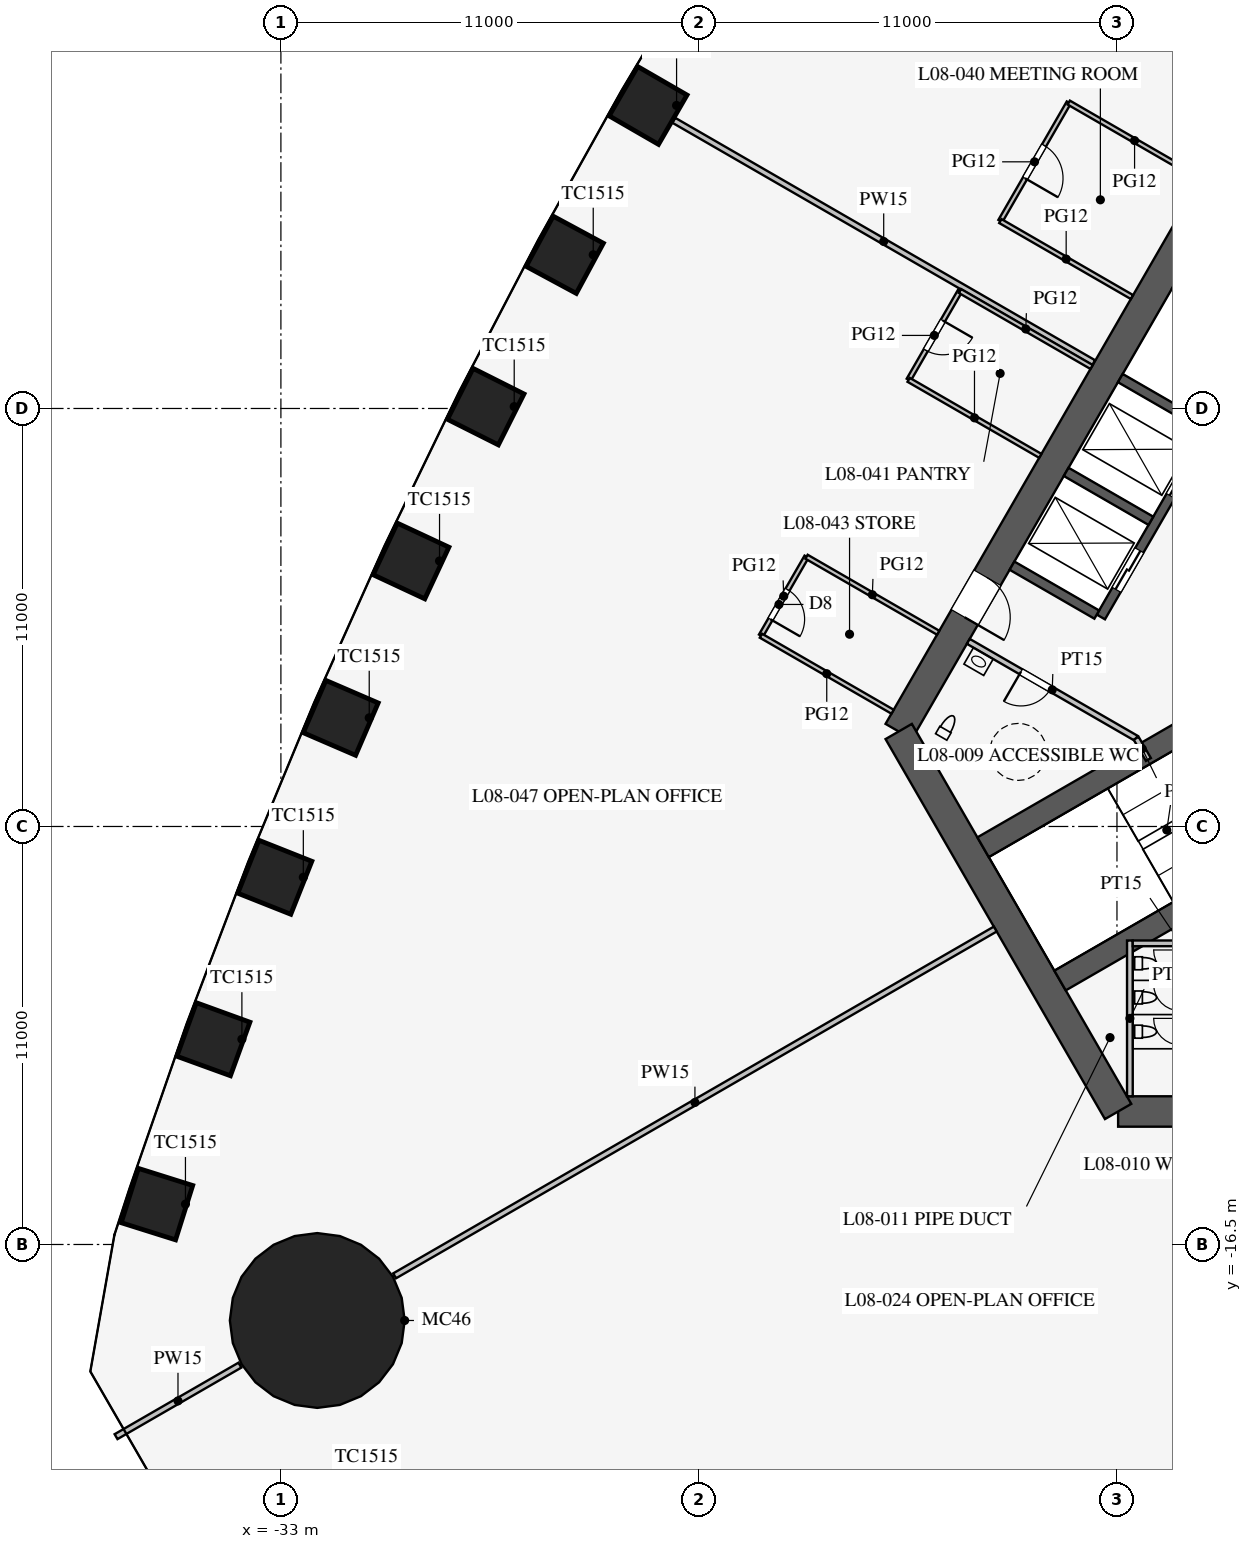
"""IFC4 building model, lengths in metres.
Left out: names, types, materials, properties, quantities, classifications, styles, units other than length and angle.
Written with IfcOpenShell. Run it as: python <this file> out.ifc"""

import sys

from ifc_helpers import new_model, si_unit, direction, frame, frame_2d, origin, origin_2d, place, context, subcontext, project, spatial, rectangle, circle, extrude, element, fill, save


model = new_model("IFC4")
c1 = context("Model", 3, precision=1e-05, world=origin(), true_north=direction((0.0, 1.0)))
c2 = subcontext(c1, "Body", "Model", "MODEL_VIEW")
j1 = project(units=[si_unit("LENGTHUNIT", "METRE"), si_unit("PLANEANGLEUNIT", "RADIAN")], contexts=[c1])
p1 = place(None, origin())
s1 = spatial("IfcSite", under=j1, at=p1, CompositionType="ELEMENT")
p2 = place(p1, origin())
s2 = spatial("IfcBuilding", under=s1, at=p2, CompositionType="ELEMENT")
p3 = place(p2, frame((0.0, 0.0, 37.5)))
s3 = spatial("IfcBuildingStorey", under=s2, at=p3, CompositionType="ELEMENT", Elevation=37.5)
for number, where, z_axis, x_axis in (
    (1, (-23.338, 13.474, 0.0), (0.0, 0.0, 1.0), (-0.5, -0.866, 0.0)),
    (2, (-25.531, 9.544, 0.0), (0.0, 0.0, 1.0), (-0.475, -0.88, 0.0)),
    (3, (-27.611, 5.549, 0.0), (0.0, 0.0, 1.0), (-0.449, -0.894, 0.0)),
    (4, (-29.576, 1.487, 0.0), (0.0, 0.0, 1.0), (-0.423, -0.906, 0.0)),
    (5, (-31.426, -2.641, 0.0), (0.0, 0.0, 1.0), (-0.396, -0.918, 0.0)),
    (6, (-33.16, -6.836, 0.0), (0.0, 0.0, 1.0), (-0.369, -0.929, 0.0)),
    (7, (-34.776, -11.099, 0.0), (0.0, 0.0, 1.0), (-0.342, -0.94, 0.0)),
    (8, (-36.262, -15.438, 0.0), (0.0, 0.0, 1.0), (-0.3, -0.954, 0.0)),
):
    element("IfcColumn", number, at=place(p3, frame(where, z_axis=z_axis, x_axis=x_axis)), inside=s3, PredefinedType="COLUMN", context=c2, shape_type="SweptSolid", body=[
        extrude(rectangle(XDim=1.5, YDim=1.5, at=origin_2d()), origin(), (0.0, 0.0, 1.0), 4.2),
    ])
p4 = place(p3, frame((-32.043, -18.5, 0.0), z_axis=(0.0, 0.0, 1.0), x_axis=(1.0, 0.0, 0.0)))
e9 = element("IfcColumn", 9, at=p4, inside=s3, PredefinedType="COLUMN", context=c2, shape_type="SweptSolid", body=[
    extrude(circle(Radius=2.3, at=origin_2d()), origin(), (0.0, 0.0, 1.0), 4.2),
])
p5 = place(p3, frame((-10.97, -13.0, 0.0), z_axis=(0.0, 0.0, 1.0), x_axis=(1.0, 0.0, 0.0)))
e10 = element("IfcWall", 10, at=p5, inside=s3, PredefinedType="SHEAR", context=c2, shape_type="SweptSolid", body=[
    extrude(rectangle(XDim=21.939, YDim=0.8, at=frame_2d((10.97, 0.0))), origin(), (0.0, 0.0, 1.0), 4.2),
])
p6 = place(p5, frame((17.27, 0.0, 0.0)))
e11 = element("IfcOpeningElement", 11, at=p6, cuts=e10, PredefinedType="OPENING", context=c2, shape_type="SweptSolid", body=[
    extrude(rectangle(XDim=1.2, YDim=2.1, at=frame_2d((0.6, 1.05))), frame((0.0, 0.41, 0.0), z_axis=(0.0, -1.0, 0.0), x_axis=(1.0, 0.0, 0.0)), (0.0, 0.0, 1.0), 0.82),
])
p7 = place(p5, frame((3.47, 0.0, 0.0)))
e12 = element("IfcOpeningElement", 12, at=p7, cuts=e10, PredefinedType="OPENING", context=c2, shape_type="SweptSolid", body=[
    extrude(rectangle(XDim=1.2, YDim=2.1, at=frame_2d((0.6, 1.05))), frame((0.0, 0.41, 0.0), z_axis=(0.0, -1.0, 0.0), x_axis=(1.0, 0.0, 0.0)), (0.0, 0.0, 1.0), 0.82),
])
p8 = place(p3, frame((-5.773, 16.0, 0.0), z_axis=(0.0, 0.0, 1.0), x_axis=(-0.500002442456, -0.866023993627, 0.0)))
e13 = element("IfcWall", 13, at=p8, inside=s3, PredefinedType="SHEAR", context=c2, shape_type="SweptSolid", body=[
    extrude(rectangle(XDim=21.939, YDim=0.8, at=frame_2d((10.97, 0.0))), origin(), (0.0, 0.0, 1.0), 4.2),
])
p9 = place(p8, frame((17.27, 0.0, 0.0)))
e14 = element("IfcOpeningElement", 14, at=p9, cuts=e13, PredefinedType="OPENING", context=c2, shape_type="SweptSolid", body=[
    extrude(rectangle(XDim=1.2, YDim=2.1, at=frame_2d((0.6, 1.05))), frame((0.0, 0.41, 0.0), z_axis=(0.0, -1.0, 0.0), x_axis=(1.0, 0.0, 0.0)), (0.0, 0.0, 1.0), 0.82),
])
p10 = place(p8, frame((3.47, 0.0, 0.0)))
e15 = element("IfcOpeningElement", 15, at=p10, cuts=e13, PredefinedType="OPENING", context=c2, shape_type="SweptSolid", body=[
    extrude(rectangle(XDim=1.2, YDim=2.1, at=frame_2d((0.6, 1.05))), frame((0.0, 0.41, 0.0), z_axis=(0.0, -1.0, 0.0), x_axis=(1.0, 0.0, 0.0)), (0.0, 0.0, 1.0), 0.82),
])
p11 = place(p3, frame((-16.743, -3.0, 0.0), z_axis=(0.0, 0.0, 1.0), x_axis=(0.499995765644, -0.866027848477, 0.0)))
e16 = element("IfcWall", 16, at=p11, inside=s3, PredefinedType="SHEAR", context=c2, shape_type="SweptSolid", body=[
    extrude(rectangle(XDim=11.547, YDim=0.8, at=frame_2d((5.773, 0.0))), origin(), (0.0, 0.0, 1.0), 4.2),
])
p12 = place(p3, frame((-5.724, 9.886, 0.0), z_axis=(0.0, 0.0, 1.0), x_axis=(-0.500001763848, -0.866024385424, 0.0)))
e17 = element("IfcWall", 17, at=p12, inside=s3, PredefinedType="SHEAR", context=c2, shape_type="SweptSolid", body=[
    extrude(rectangle(XDim=11.4, YDim=0.25, at=frame_2d((5.7, 0.0))), origin(), (0.0, 0.0, 1.0), 4.2),
])
p13 = place(p12, frame((6.525, 0.0, 0.0)))
e18 = element("IfcOpeningElement", 18, at=p13, cuts=e17, PredefinedType="OPENING", context=c2, shape_type="SweptSolid", body=[
    extrude(rectangle(XDim=1.2, YDim=2.2, at=frame_2d((0.6, 1.1))), frame((0.0, 0.135, 0.0), z_axis=(0.0, -1.0, 0.0), x_axis=(1.0, 0.0, 0.0)), (0.0, 0.0, 1.0), 0.27),
])
p14 = place(p12, frame((9.375, 0.0, 0.0)))
e19 = element("IfcOpeningElement", 19, at=p14, cuts=e17, PredefinedType="OPENING", context=c2, shape_type="SweptSolid", body=[
    extrude(rectangle(XDim=1.2, YDim=2.2, at=frame_2d((0.6, 1.1))), frame((0.0, 0.135, 0.0), z_axis=(0.0, -1.0, 0.0), x_axis=(1.0, 0.0, 0.0)), (0.0, 0.0, 1.0), 0.27),
])
for number, where, z_axis, x_axis in (
    (20, (-7.257, 7.481, 0.0), (0.0, 0.0, 1.0), (-0.866, 0.5, 0.0)),
    (21, (-8.682, 5.012, 0.0), (0.0, 0.0, 1.0), (-0.866, 0.5, 0.0)),
    (22, (-10.107, 2.544, 0.0), (0.0, 0.0, 1.0), (-0.866, 0.5, 0.0)),
    (23, (-11.532, 0.076, 0.0), (0.0, 0.0, 1.0), (-0.866, 0.5, 0.0)),
):
    element("IfcWall", number, at=place(p3, frame(where, z_axis=z_axis, x_axis=x_axis)), inside=s3, PredefinedType="SHEAR", context=c2, shape_type="SweptSolid", body=[
        extrude(rectangle(XDim=2.575, YDim=0.25, at=frame_2d((1.288, 0.0))), origin(), (0.0, 0.0, 1.0), 4.2),
    ])
for number, where, z_axis, x_axis in (
    (24, (-6.663, -1.509, 0.0), (0.0, 0.0, 1.0), (-0.866, -0.5, 0.0)),
    (25, (-4.638, -5.016, 0.0), (0.0, 0.0, 1.0), (-0.866, -0.5, 0.0)),
):
    element("IfcWall", number, at=place(p3, frame(where, z_axis=z_axis, x_axis=x_axis)), inside=s3, PredefinedType="SHEAR", context=c2, shape_type="SweptSolid", body=[
        extrude(rectangle(XDim=9.075, YDim=0.6, at=frame_2d((4.538, 0.0))), origin(), (0.0, 0.0, 1.0), 4.2),
    ])
p15 = place(p3, frame((-10.495, -3.178, 0.0), z_axis=(0.0, 0.0, 1.0), x_axis=(-0.86602216432, 0.500005610874, 0.0)))
e26 = element("IfcWall", 26, at=p15, inside=s3, PredefinedType="PARTITIONING", context=c2, shape_type="SweptSolid", body=[
    extrude(rectangle(XDim=5.1, YDim=0.15, at=frame_2d((2.55, 0.0))), origin(), (0.0, 0.0, 1.0), 4.0),
])
p16 = place(p15, frame((2.6, 0.0, 0.0)))
e27 = element("IfcOpeningElement", 27, at=p16, cuts=e26, PredefinedType="OPENING", context=c2, shape_type="SweptSolid", body=[
    extrude(rectangle(XDim=0.9, YDim=2.1, at=frame_2d((0.45, 1.05))), frame((0.0, 0.085, 0.0), z_axis=(0.0, -1.0, 0.0), x_axis=(1.0, 0.0, 0.0)), (0.0, 0.0, 1.0), 0.17),
])
p17 = place(p3, frame((-10.495, -3.178, 0.0), z_axis=(0.0, 0.0, 1.0), x_axis=(0.499842556608, -0.866116284689, 0.0)))
e28 = element("IfcWall", 28, at=p17, inside=s3, PredefinedType="PARTITIONING", context=c2, shape_type="SweptSolid", body=[
    extrude(rectangle(XDim=0.645, YDim=0.15, at=frame_2d((0.323, 0.0))), origin(), (0.0, 0.0, 1.0), 4.0),
])
p18 = place(p3, frame((-10.66, -8.5, 0.0), z_axis=(0.0, 0.0, 1.0), x_axis=(0.0, -1.0, 0.0)))
e29 = element("IfcWall", 29, at=p18, inside=s3, PredefinedType="PARTITIONING", context=c2, shape_type="SweptSolid", body=[
    extrude(rectangle(XDim=4.1, YDim=0.15, at=frame_2d((2.05, 0.0))), origin(), (0.0, 0.0, 1.0), 4.0),
])
p19 = place(p3, frame((-8.075, -8.575, 0.0), z_axis=(0.0, 0.0, 1.0), x_axis=(-1.0, 0.0, 0.0)))
e30 = element("IfcWall", 30, at=p19, inside=s3, PredefinedType="PARTITIONING", context=c2, shape_type="SweptSolid", body=[
    extrude(rectangle(XDim=2.51, YDim=0.15, at=frame_2d((1.255, 0.0))), origin(), (0.0, 0.0, 1.0), 4.0),
])
p20 = place(p3, frame((-14.203, -8.2, 0.0), z_axis=(0.0, 0.0, 1.0), x_axis=(-0.866024965723, -0.500000758745, 0.0)))
e31 = element("IfcWall", 31, at=p20, inside=s3, PredefinedType="PARTITIONING", context=c2, shape_type="SweptSolid", body=[
    extrude(rectangle(XDim=18.25, YDim=0.15, at=frame_2d((9.125, 0.0))), origin(), (0.0, 0.0, 1.0), 2.3),
])
p21 = place(p3, frame((-34.078, -19.675, 0.0), z_axis=(0.0, 0.0, 1.0), x_axis=(-0.866019247219, -0.500010663332, 0.0)))
e32 = element("IfcWall", 32, at=p21, inside=s3, PredefinedType="PARTITIONING", context=c2, shape_type="SweptSolid", body=[
    extrude(rectangle(XDim=3.764, YDim=0.15, at=frame_2d((1.882, 0.0))), origin(), (0.0, 0.0, 1.0), 2.3),
])
p22 = place(p3, frame((-11.613, 6.705, 0.0), z_axis=(0.0, 0.0, 1.0), x_axis=(-0.86602785495, 0.499995754432, 0.0)))
e33 = element("IfcWall", 33, at=p22, inside=s3, PredefinedType="PARTITIONING", context=c2, shape_type="SweptSolid", body=[
    extrude(rectangle(XDim=12.759, YDim=0.15, at=frame_2d((6.379, 0.0))), origin(), (0.0, 0.0, 1.0), 3.2),
])
p23 = place(p3, frame((-15.131, 8.592, 0.0), z_axis=(0.0, 0.0, 1.0), x_axis=(-0.50000943426, -0.866019956843, 0.0)))
e34 = element("IfcWall", 34, at=p23, inside=s3, PredefinedType="PARTITIONING", context=c2, shape_type="SweptSolid", body=[
    extrude(rectangle(XDim=2.7, YDim=0.12, at=frame_2d((1.35, 0.0))), origin(), (0.0, 0.0, 1.0), 2.9),
])
p24 = place(p23, frame((0.9, 0.0, 0.15)))
e35 = element("IfcOpeningElement", 35, at=p24, cuts=e34, PredefinedType="OPENING", context=c2, shape_type="SweptSolid", body=[
    extrude(rectangle(XDim=0.9, YDim=2.1, at=frame_2d((0.45, 1.05))), frame((0.0, 0.07, 0.0), z_axis=(0.0, -1.0, 0.0), x_axis=(1.0, 0.0, 0.0)), (0.0, 0.0, 1.0), 0.14),
])
p25 = place(p3, frame((-19.169, 1.599, 0.0), z_axis=(0.0, 0.0, 1.0), x_axis=(-0.499957262057, -0.866050077142, 0.0)))
e36 = element("IfcWall", 36, at=p25, inside=s3, PredefinedType="PARTITIONING", context=c2, shape_type="SweptSolid", body=[
    extrude(rectangle(XDim=2.4, YDim=0.12, at=frame_2d((1.2, 0.0))), origin(), (0.0, 0.0, 1.0), 2.9),
])
p26 = place(p25, frame((1.0, 0.0, 0.15)))
e37 = element("IfcOpeningElement", 37, at=p26, cuts=e36, PredefinedType="OPENING", context=c2, shape_type="SweptSolid", body=[
    extrude(rectangle(XDim=0.9, YDim=2.1, at=frame_2d((0.45, 1.05))), frame((0.0, 0.07, 0.0), z_axis=(0.0, -1.0, 0.0), x_axis=(1.0, 0.0, 0.0)), (0.0, 0.0, 1.0), 0.14),
])
p27 = place(p3, frame((-12.269, 13.55, 0.0), z_axis=(0.0, 0.0, 1.0), x_axis=(-0.500012057535, -0.866018442252, 0.0)))
e38 = element("IfcWall", 38, at=p27, inside=s3, PredefinedType="PARTITIONING", context=c2, shape_type="SweptSolid", body=[
    extrude(rectangle(XDim=3.6, YDim=0.12, at=frame_2d((1.8, 0.0))), origin(), (0.0, 0.0, 1.0), 2.9),
])
p28 = place(p27, frame((1.3, 0.0, 0.15)))
e39 = element("IfcOpeningElement", 39, at=p28, cuts=e38, PredefinedType="OPENING", context=c2, shape_type="SweptSolid", body=[
    extrude(rectangle(XDim=1.0, YDim=2.1, at=frame_2d((0.5, 1.05))), frame((0.0, 0.07, 0.0), z_axis=(0.0, -1.0, 0.0), x_axis=(1.0, 0.0, 0.0)), (0.0, 0.0, 1.0), 0.14),
])
for number, where, z_axis, x_axis in (
    (40, (-11.667, 6.592, 0.0), (0.0, 0.0, 1.0), (-0.866, 0.5, 0.0)),
    (41, (-16.905, -2.48, 0.0), (0.0, 0.0, 1.0), (-0.866, 0.5, 0.0)),
    (42, (-13.017, 4.253, 0.0), (0.0, 0.0, 1.0), (-0.866, 0.5, 0.0)),
    (43, (-15.705, -0.401, 0.0), (0.0, 0.0, 1.0), (-0.866, 0.5, 0.0)),
    (44, (-10.605, 8.432, 0.0), (0.0, 0.0, 1.0), (-0.866, 0.5, 0.0)),
    (45, (-8.805, 11.55, 0.0), (0.0, 0.0, 1.0), (-0.866, 0.5, 0.0)),
    (46, (-7.355, 14.061, 0.0), (0.0, 0.0, 1.0), (-0.866, 0.5, 0.0)),
):
    element("IfcWall", number, at=place(p3, frame(where, z_axis=z_axis, x_axis=x_axis)), inside=s3, PredefinedType="PARTITIONING", context=c2, shape_type="SweptSolid", body=[
        extrude(rectangle(XDim=4.0, YDim=0.12, at=frame_2d((2.0, 0.0))), origin(), (0.0, 0.0, 1.0), 2.9),
    ])
p29 = place(p16, origin())
e47 = element("IfcDoor", 47, at=p29, inside=s3, OperationType="SINGLE_SWING_RIGHT", PredefinedType="DOOR", context=c2, shape_type="SweptSolid", body=[
    extrude(rectangle(XDim=0.9, YDim=2.1, at=frame_2d((0.45, 1.05))), frame((0.0, 0.025, 0.0), z_axis=(0.0, -1.0, 0.0), x_axis=(1.0, 0.0, 0.0)), (0.0, 0.0, 1.0), 0.05),
])
fill(e27, e47)
p30 = place(p9, origin())
e48 = element("IfcDoor", 48, at=p30, inside=s3, OperationType="SINGLE_SWING_RIGHT", PredefinedType="DOOR", context=c2, shape_type="SweptSolid", body=[
    extrude(rectangle(XDim=1.2, YDim=2.1, at=frame_2d((0.6, 1.05))), frame((0.0, 0.025, 0.0), z_axis=(0.0, -1.0, 0.0), x_axis=(1.0, 0.0, 0.0)), (0.0, 0.0, 1.0), 0.05),
])
fill(e14, e48)
p31 = place(p28, origin())
e49 = element("IfcDoor", 49, at=p31, inside=s3, OperationType="SINGLE_SWING_RIGHT", PredefinedType="DOOR", context=c2, shape_type="SweptSolid", body=[
    extrude(rectangle(XDim=1.0, YDim=2.1, at=frame_2d((0.5, 1.05))), frame((0.0, 0.025, 0.0), z_axis=(0.0, -1.0, 0.0), x_axis=(1.0, 0.0, 0.0)), (0.0, 0.0, 1.0), 0.05),
])
fill(e39, e49)
p32 = place(p24, origin())
e50 = element("IfcDoor", 50, at=p32, inside=s3, OperationType="SINGLE_SWING_LEFT", PredefinedType="DOOR", context=c2, shape_type="SweptSolid", body=[
    extrude(rectangle(XDim=0.9, YDim=2.1, at=frame_2d((0.45, 1.05))), frame((0.0, 0.025, 0.0), z_axis=(0.0, -1.0, 0.0), x_axis=(1.0, 0.0, 0.0)), (0.0, 0.0, 1.0), 0.05),
])
fill(e35, e50)
p33 = place(p26, origin())
e51 = element("IfcDoor", 51, at=p33, inside=s3, OperationType="SINGLE_SWING_RIGHT", PredefinedType="DOOR", context=c2, shape_type="SweptSolid", body=[
    extrude(rectangle(XDim=0.9, YDim=2.1, at=frame_2d((0.45, 1.05))), frame((0.0, 0.025, 0.0), z_axis=(0.0, -1.0, 0.0), x_axis=(1.0, 0.0, 0.0)), (0.0, 0.0, 1.0), 0.05),
])
fill(e37, e51)
p34 = place(p13, origin())
e52 = element("IfcDoor", 52, at=p34, inside=s3, OperationType="DOUBLE_DOOR_SLIDING", PredefinedType="DOOR", context=c2, shape_type="SweptSolid", body=[
    extrude(rectangle(XDim=1.2, YDim=2.2, at=frame_2d((0.6, 1.1))), frame((0.0, 0.025, 0.0), z_axis=(0.0, -1.0, 0.0), x_axis=(1.0, 0.0, 0.0)), (0.0, 0.0, 1.0), 0.05),
])
fill(e18, e52)
p35 = place(p14, origin())
e53 = element("IfcDoor", 53, at=p35, inside=s3, OperationType="DOUBLE_DOOR_SLIDING", PredefinedType="DOOR", context=c2, shape_type="SweptSolid", body=[
    extrude(rectangle(XDim=1.2, YDim=2.2, at=frame_2d((0.6, 1.1))), frame((0.0, 0.025, 0.0), z_axis=(0.0, -1.0, 0.0), x_axis=(1.0, 0.0, 0.0)), (0.0, 0.0, 1.0), 0.05),
])
fill(e19, e53)
save(model, sys.argv[1])
